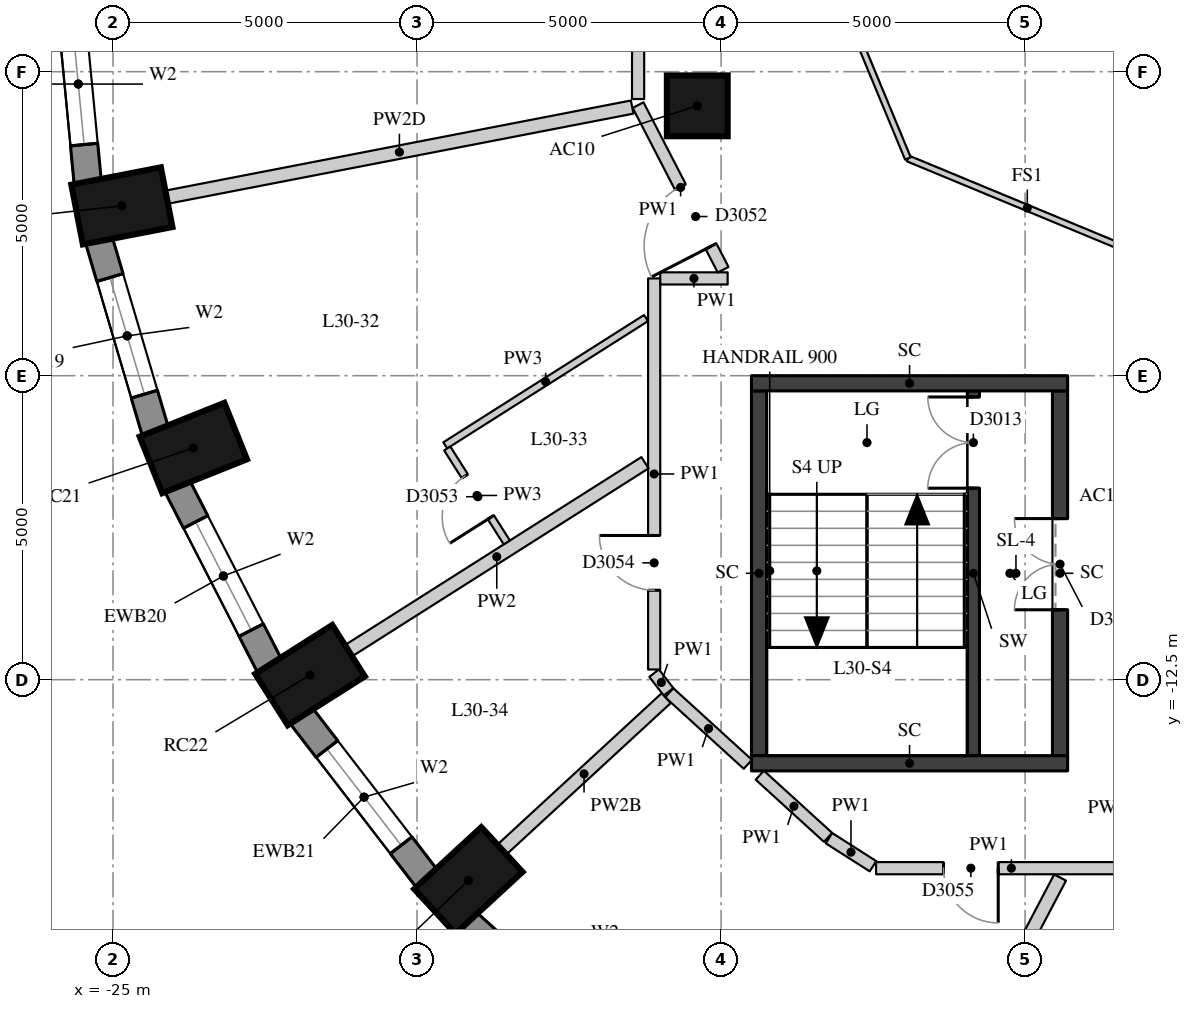
"""IFC4 building model, lengths in metres.
Left out: names, types, materials, properties, quantities, classifications, styles, units other than length and angle.
Written with IfcOpenShell. Run it as: python <this file> out.ifc"""

import sys

from ifc_helpers import new_model, si_unit, direction, frame, frame_2d, origin, origin_2d, place, context, subcontext, project, spatial, rectangle, extrude, element, fill, save


model = new_model("IFC4")
c1 = context("Model", 3, precision=1e-05, world=origin(), true_north=direction((0.0, 1.0)))
c2 = subcontext(c1, "Body", "Model", "MODEL_VIEW")
j1 = project(units=[si_unit("LENGTHUNIT", "METRE"), si_unit("PLANEANGLEUNIT", "RADIAN")], contexts=[c1])
p1 = place(None, origin())
s1 = spatial("IfcSite", under=j1, at=p1, CompositionType="ELEMENT")
p2 = place(p1, origin())
s2 = spatial("IfcBuilding", under=s1, at=p2, CompositionType="ELEMENT")
p3 = place(p2, frame((0.0, 0.0, 108.7)))
s3 = spatial("IfcBuildingStorey", under=s2, at=p3, CompositionType="ELEMENT", Elevation=108.7)
for number, where, z_axis, x_axis in (
    (1, (-24.854, -4.707, 0.0), (0.0, 0.0, 1.0), (-0.982, -0.19, 0.0)),
    (2, (-23.679, -8.689, 0.0), (0.0, 0.0, 1.0), (-0.929, -0.371, 0.0)),
    (3, (-21.76, -12.425, 0.0), (0.0, 0.0, 1.0), (-0.845, -0.536, 0.0)),
    (4, (-19.156, -15.802, 0.0), (0.0, 0.0, 1.0), (-0.735, -0.678, 0.0)),
):
    element("IfcColumn", number, at=place(p3, frame(where, z_axis=z_axis, x_axis=x_axis)), inside=s3, PredefinedType="COLUMN", context=c2, shape_type="SweptSolid", body=[
        extrude(rectangle(XDim=1.5, YDim=1.0, at=origin_2d()), origin(), (0.0, 0.0, 1.0), 3.3),
    ])
p4 = place(p3, frame((-15.391, -3.062, 0.0), z_axis=(0.0, 0.0, 1.0), x_axis=(1.0, 0.0, 0.0)))
e5 = element("IfcColumn", 5, at=p4, inside=s3, PredefinedType="COLUMN", context=c2, shape_type="SweptSolid", body=[
    extrude(rectangle(XDim=1.0, YDim=1.0, at=origin_2d()), origin(), (0.0, 0.0, 1.0), 3.3),
])
p5 = place(p3, frame((-25.728, -1.08, 0.0), z_axis=(0.0, 0.0, 1.0), x_axis=(0.095967726544, -0.995384446062, 0.0)))
e6 = element("IfcWall", 6, at=p5, inside=s3, PredefinedType="SOLIDWALL", context=c2, shape_type="SweptSolid", body=[
    extrude(rectangle(XDim=3.261, YDim=0.45, at=frame_2d((1.631, 0.0))), origin(), (0.0, 0.0, 1.0), 3.02),
])
p6 = place(p5, frame((0.631, 0.0, 0.4)))
e7 = element("IfcOpeningElement", 7, at=p6, cuts=e6, PredefinedType="OPENING", context=c2, shape_type="SweptSolid", body=[
    extrude(rectangle(XDim=2.0, YDim=1.75, at=frame_2d((1.0, 0.875))), frame((0.0, 0.235, 0.0), z_axis=(0.0, -1.0, 0.0), x_axis=(1.0, 0.0, 0.0)), (0.0, 0.0, 1.0), 0.47),
])
p7 = place(p3, frame((-25.232, -5.269, 0.0), z_axis=(0.0, 0.0, 1.0), x_axis=(0.283051078697, -0.959104836214, 0.0)))
e8 = element("IfcWall", 8, at=p7, inside=s3, PredefinedType="SOLIDWALL", context=c2, shape_type="SweptSolid", body=[
    extrude(rectangle(XDim=3.286, YDim=0.45, at=frame_2d((1.643, 0.0))), origin(), (0.0, 0.0, 1.0), 3.02),
])
p8 = place(p7, frame((0.643, 0.0, 0.4)))
e9 = element("IfcOpeningElement", 9, at=p8, cuts=e8, PredefinedType="OPENING", context=c2, shape_type="SweptSolid", body=[
    extrude(rectangle(XDim=2.0, YDim=1.75, at=frame_2d((1.0, 0.875))), frame((0.0, 0.235, 0.0), z_axis=(0.0, -1.0, 0.0), x_axis=(1.0, 0.0, 0.0)), (0.0, 0.0, 1.0), 0.47),
])
p9 = place(p3, frame((-23.945, -9.312, 0.0), z_axis=(0.0, 0.0, 1.0), x_axis=(0.456828186229, -0.889554949549, 0.0)))
e10 = element("IfcWall", 10, at=p9, inside=s3, PredefinedType="SOLIDWALL", context=c2, shape_type="SweptSolid", body=[
    extrude(rectangle(XDim=3.333, YDim=0.45, at=frame_2d((1.667, 0.0))), origin(), (0.0, 0.0, 1.0), 3.02),
])
p10 = place(p9, frame((0.666, 0.0, 0.4)))
e11 = element("IfcOpeningElement", 11, at=p10, cuts=e10, PredefinedType="OPENING", context=c2, shape_type="SweptSolid", body=[
    extrude(rectangle(XDim=2.0, YDim=1.75, at=frame_2d((1.0, 0.875))), frame((0.0, 0.235, 0.0), z_axis=(0.0, -1.0, 0.0), x_axis=(1.0, 0.0, 0.0)), (0.0, 0.0, 1.0), 0.47),
])
p11 = place(p3, frame((-21.908, -13.087, 0.0), z_axis=(0.0, 0.0, 1.0), x_axis=(0.610693945156, -0.791866721961, 0.0)))
e12 = element("IfcWall", 12, at=p11, inside=s3, PredefinedType="SOLIDWALL", context=c2, shape_type="SweptSolid", body=[
    extrude(rectangle(XDim=3.395, YDim=0.45, at=frame_2d((1.697, 0.0))), origin(), (0.0, 0.0, 1.0), 3.02),
])
p12 = place(p11, frame((0.697, 0.0, 0.4)))
e13 = element("IfcOpeningElement", 13, at=p12, cuts=e12, PredefinedType="OPENING", context=c2, shape_type="SweptSolid", body=[
    extrude(rectangle(XDim=2.0, YDim=1.75, at=frame_2d((1.0, 0.875))), frame((0.0, 0.235, 0.0), z_axis=(0.0, -1.0, 0.0), x_axis=(1.0, 0.0, 0.0)), (0.0, 0.0, 1.0), 0.47),
])
p13 = place(p3, frame((-19.184, -16.481, 0.0), z_axis=(0.0, 0.0, 1.0), x_axis=(0.740364106106, -0.672206062446, 0.0)))
e14 = element("IfcWall", 14, at=p13, inside=s3, PredefinedType="SOLIDWALL", context=c2, shape_type="SweptSolid", body=[
    extrude(rectangle(XDim=3.464, YDim=0.45, at=frame_2d((1.732, 0.0))), origin(), (0.0, 0.0, 1.0), 3.02),
])
p14 = place(p13, frame((0.732, 0.0, 0.4)))
e15 = element("IfcOpeningElement", 15, at=p14, cuts=e14, PredefinedType="OPENING", context=c2, shape_type="SweptSolid", body=[
    extrude(rectangle(XDim=2.0, YDim=1.75, at=frame_2d((1.0, 0.875))), frame((0.0, 0.235, 0.0), z_axis=(0.0, -1.0, 0.0), x_axis=(1.0, 0.0, 0.0)), (0.0, 0.0, 1.0), 0.47),
])
p15 = place(p3, frame((-10.85, -13.75, 0.0), z_axis=(0.0, 0.0, 1.0), x_axis=(0.0, 1.0, 0.0)))
e16 = element("IfcWall", 16, at=p15, inside=s3, PredefinedType="SHEAR", context=c2, shape_type="SweptSolid", body=[
    extrude(rectangle(XDim=6.0, YDim=0.2, at=frame_2d((3.0, 0.0))), origin(), (0.0, 0.0, 1.0), 3.02),
])
p16 = place(p15, frame((4.4, 0.0, 0.0)))
e17 = element("IfcOpeningElement", 17, at=p16, cuts=e16, PredefinedType="OPENING", context=c2, shape_type="SweptSolid", body=[
    extrude(rectangle(XDim=1.5, YDim=2.1, at=frame_2d((0.75, 1.05))), frame((0.0, 0.11, 0.0), z_axis=(0.0, -1.0, 0.0), x_axis=(1.0, 0.0, 0.0)), (0.0, 0.0, 1.0), 0.22),
])
p17 = place(p3, frame((-14.375, -13.75, -0.28), z_axis=(0.0, 0.0, 1.0), x_axis=(0.0, 1.0, 0.0)))
e18 = element("IfcWall", 18, at=p17, inside=s3, PredefinedType="SHEAR", context=c2, shape_type="SweptSolid", body=[
    extrude(rectangle(XDim=6.0, YDim=0.25, at=frame_2d((3.0, 0.0))), origin(), (0.0, 0.0, 1.0), 3.3),
])
p18 = place(p3, frame((-9.425, -13.75, -0.28), z_axis=(0.0, 0.0, 1.0), x_axis=(0.0, 1.0, 0.0)))
e19 = element("IfcWall", 19, at=p18, inside=s3, PredefinedType="SHEAR", context=c2, shape_type="SweptSolid", body=[
    extrude(rectangle(XDim=6.0, YDim=0.25, at=frame_2d((3.0, 0.0))), origin(), (0.0, 0.0, 1.0), 3.3),
])
p19 = place(p18, frame((2.4, 0.0, 0.28)))
e20 = element("IfcOpeningElement", 20, at=p19, cuts=e19, PredefinedType="OPENING", context=c2, shape_type="SweptSolid", body=[
    extrude(rectangle(XDim=1.5, YDim=2.1, at=frame_2d((0.75, 1.05))), frame((0.0, 0.135, 0.0), z_axis=(0.0, -1.0, 0.0), x_axis=(1.0, 0.0, 0.0)), (0.0, 0.0, 1.0), 0.27),
])
for number, where, z_axis, x_axis in (
    (21, (-14.5, -7.625, -0.28), (0.0, 0.0, 1.0), (1.0, 0.0, 0.0)),
    (22, (-14.5, -13.875, -0.28), (0.0, 0.0, 1.0), (1.0, 0.0, 0.0)),
):
    element("IfcWall", number, at=place(p3, frame(where, z_axis=z_axis, x_axis=x_axis)), inside=s3, PredefinedType="SHEAR", context=c2, shape_type="SweptSolid", body=[
        extrude(rectangle(XDim=5.2, YDim=0.25, at=frame_2d((2.6, 0.0))), origin(), (0.0, 0.0, 1.0), 3.3),
    ])
p20 = place(p3, frame((-14.56, -13.891, 0.0), z_axis=(0.0, 0.0, 1.0), x_axis=(-0.739440483737, 0.673221932954, 0.0)))
e23 = element("IfcWall", 23, at=p20, inside=s3, PredefinedType="PARTITIONING", context=c2, shape_type="SweptSolid", body=[
    extrude(rectangle(XDim=1.748, YDim=0.2, at=frame_2d((0.874, 0.0))), origin(), (0.0, 0.0, 1.0), 3.02),
])
p21 = place(p3, frame((-15.864, -12.699, 0.0), z_axis=(0.0, 0.0, 1.0), x_axis=(-0.61004607296, 0.792365943782, 0.0)))
e24 = element("IfcWall", 24, at=p21, inside=s3, PredefinedType="PARTITIONING", context=c2, shape_type="SweptSolid", body=[
    extrude(rectangle(XDim=0.387, YDim=0.2, at=frame_2d((0.193, 0.0))), origin(), (0.0, 0.0, 1.0), 3.02),
])
p22 = place(p3, frame((-16.1, -12.332, 0.0), z_axis=(0.0, 0.0, 1.0), x_axis=(0.0, 1.0, 0.0)))
e25 = element("IfcWall", 25, at=p22, inside=s3, PredefinedType="PARTITIONING", context=c2, shape_type="SweptSolid", body=[
    extrude(rectangle(XDim=6.432, YDim=0.2, at=frame_2d((3.216, 0.0))), origin(), (0.0, 0.0, 1.0), 3.02),
])
p23 = place(p22, frame((1.304, 0.0, 0.0)))
e26 = element("IfcOpeningElement", 26, at=p23, cuts=e25, PredefinedType="OPENING", context=c2, shape_type="SweptSolid", body=[
    extrude(rectangle(XDim=0.9, YDim=2.1, at=frame_2d((0.45, 1.05))), frame((0.0, 0.11, 0.0), z_axis=(0.0, -1.0, 0.0), x_axis=(1.0, 0.0, 0.0)), (0.0, 0.0, 1.0), 0.22),
])
p24 = place(p3, frame((-16.0, -5.9, 0.0), z_axis=(0.0, 0.0, 1.0), x_axis=(1.0, 0.0, 0.0)))
e27 = element("IfcWall", 27, at=p24, inside=s3, PredefinedType="PARTITIONING", context=c2, shape_type="SweptSolid", body=[
    extrude(rectangle(XDim=1.108, YDim=0.2, at=frame_2d((0.554, 0.0))), origin(), (0.0, 0.0, 1.0), 3.02),
])
p25 = place(p3, frame((-14.966, -5.757, 0.0), z_axis=(0.0, 0.0, 1.0), x_axis=(-0.458904116107, 0.888485797422, 0.0)))
e28 = element("IfcWall", 28, at=p25, inside=s3, PredefinedType="PARTITIONING", context=c2, shape_type="SweptSolid", body=[
    extrude(rectangle(XDim=3.047, YDim=0.2, at=frame_2d((1.524, 0.0))), origin(), (0.0, 0.0, 1.0), 3.02),
])
p26 = place(p25, frame((0.435, 0.0, 0.0)))
e29 = element("IfcOpeningElement", 29, at=p26, cuts=e28, PredefinedType="OPENING", context=c2, shape_type="SweptSolid", body=[
    extrude(rectangle(XDim=1.1, YDim=2.1, at=frame_2d((0.55, 1.05))), frame((0.0, 0.11, 0.0), z_axis=(0.0, -1.0, 0.0), x_axis=(1.0, 0.0, 0.0)), (0.0, 0.0, 1.0), 0.22),
])
p27 = place(p3, frame((-16.364, -2.95, 0.0), z_axis=(0.0, 0.0, 1.0), x_axis=(0.0, 1.0, 0.0)))
e30 = element("IfcWall", 30, at=p27, inside=s3, PredefinedType="PARTITIONING", context=c2, shape_type="SweptSolid", body=[
    extrude(rectangle(XDim=4.799, YDim=0.2, at=frame_2d((2.4, 0.0))), origin(), (0.0, 0.0, 1.0), 2.52),
])
p28 = place(p27, frame((0.835, 0.0, 0.0)))
e31 = element("IfcOpeningElement", 31, at=p28, cuts=e30, PredefinedType="OPENING", context=c2, shape_type="SweptSolid", body=[
    extrude(rectangle(XDim=0.9, YDim=2.1, at=frame_2d((0.45, 1.05))), frame((0.0, 0.11, 0.0), z_axis=(0.0, -1.0, 0.0), x_axis=(1.0, 0.0, 0.0)), (0.0, 0.0, 1.0), 0.22),
])
p29 = place(p3, frame((-8.0, -15.6, 0.0), z_axis=(0.0, 0.0, 1.0), x_axis=(-1.0, 0.0, 0.0)))
e32 = element("IfcWall", 32, at=p29, inside=s3, PredefinedType="PARTITIONING", context=c2, shape_type="SweptSolid", body=[
    extrude(rectangle(XDim=4.451, YDim=0.2, at=frame_2d((2.226, 0.0))), origin(), (0.0, 0.0, 1.0), 3.02),
])
p30 = place(p29, frame((2.442, 0.0, 0.0)))
e33 = element("IfcOpeningElement", 33, at=p30, cuts=e32, PredefinedType="OPENING", context=c2, shape_type="SweptSolid", body=[
    extrude(rectangle(XDim=0.9, YDim=2.1, at=frame_2d((0.45, 1.05))), frame((0.0, 0.11, 0.0), z_axis=(0.0, -1.0, 0.0), x_axis=(1.0, 0.0, 0.0)), (0.0, 0.0, 1.0), 0.22),
])
p31 = place(p3, frame((-12.501, -15.568, 0.0), z_axis=(0.0, 0.0, 1.0), x_axis=(-0.843169167706, 0.537648355926, 0.0)))
e34 = element("IfcWall", 34, at=p31, inside=s3, PredefinedType="PARTITIONING", context=c2, shape_type="SweptSolid", body=[
    extrude(rectangle(XDim=0.858, YDim=0.2, at=frame_2d((0.429, 0.0))), origin(), (0.0, 0.0, 1.0), 3.02),
])
p32 = place(p3, frame((-13.24, -15.093, 0.0), z_axis=(0.0, 0.0, 1.0), x_axis=(-0.739438095557, 0.673224556028, 0.0)))
e35 = element("IfcWall", 35, at=p32, inside=s3, PredefinedType="PARTITIONING", context=c2, shape_type="SweptSolid", body=[
    extrude(rectangle(XDim=1.519, YDim=0.2, at=frame_2d((0.76, 0.0))), origin(), (0.0, 0.0, 1.0), 3.02),
])
p33 = place(p3, frame((-24.118, -4.564, 0.0), z_axis=(0.0, 0.0, 1.0), x_axis=(0.981765151757, 0.190097834799, 0.0)))
e36 = element("IfcWall", 36, at=p33, inside=s3, PredefinedType="PARTITIONING", context=c2, shape_type="SweptSolid", body=[
    extrude(rectangle(XDim=7.798, YDim=0.22, at=frame_2d((3.899, 0.0))), origin(), (0.0, 0.0, 1.0), 2.47),
])
p34 = place(p3, frame((-21.126, -12.023, 0.0), z_axis=(0.0, 0.0, 1.0), x_axis=(0.844499715613, 0.535556001114, 0.0)))
e37 = element("IfcWall", 37, at=p34, inside=s3, PredefinedType="PARTITIONING", context=c2, shape_type="SweptSolid", body=[
    extrude(rectangle(XDim=5.773, YDim=0.22, at=frame_2d((2.887, 0.0))), origin(), (0.0, 0.0, 1.0), 3.02),
])
p35 = place(p3, frame((-18.604, -15.294, 0.0), z_axis=(0.0, 0.0, 1.0), x_axis=(0.73529495628, 0.677747244383, 0.0)))
e38 = element("IfcWall", 38, at=p35, inside=s3, PredefinedType="PARTITIONING", context=c2, shape_type="SweptSolid", body=[
    extrude(rectangle(XDim=3.674, YDim=0.22, at=frame_2d((1.837, 0.0))), origin(), (0.0, 0.0, 1.0), 2.57),
])
p36 = place(p3, frame((-11.876, -20.418, 0.0), z_axis=(0.0, 0.0, 1.0), x_axis=(0.465320539057, 0.885142246157, 0.0)))
e39 = element("IfcWall", 39, at=p36, inside=s3, PredefinedType="PARTITIONING", context=c2, shape_type="SweptSolid", body=[
    extrude(rectangle(XDim=5.269, YDim=0.22, at=frame_2d((2.635, 0.0))), origin(), (0.0, 0.0, 1.0), 3.02),
])
p37 = place(p3, frame((-16.234, -6.552, 0.0), z_axis=(0.0, 0.0, 1.0), x_axis=(-0.844514089089, -0.535533335406, 0.0)))
e40 = element("IfcWall", 40, at=p37, inside=s3, PredefinedType="PARTITIONING", context=c2, shape_type="SweptSolid", body=[
    extrude(rectangle(XDim=3.91, YDim=0.12, at=frame_2d((1.955, 0.0))), origin(), (0.0, 0.0, 1.0), 3.02),
])
p38 = place(p3, frame((-6.25, -14.013, 0.0), z_axis=(0.0, 0.0, 1.0), x_axis=(-0.465288210927, -0.885159240347, 0.0)))
e41 = element("IfcWall", 41, at=p38, inside=s3, PredefinedType="PARTITIONING", context=c2, shape_type="SweptSolid", body=[
    extrude(rectangle(XDim=5.644, YDim=0.12, at=frame_2d((2.822, 0.0))), origin(), (0.0, 0.0, 1.0), 3.02),
])
p39 = place(p3, frame((-19.503, -8.697, 0.0), z_axis=(0.0, 0.0, 1.0), x_axis=(0.535467767516, -0.844555664211, 0.0)))
e42 = element("IfcWall", 42, at=p39, inside=s3, PredefinedType="PARTITIONING", context=c2, shape_type="SweptSolid", body=[
    extrude(rectangle(XDim=1.83, YDim=0.12, at=frame_2d((0.915, 0.0))), origin(), (0.0, 0.0, 1.0), 3.02),
])
p40 = place(p39, frame((0.54, 0.0, 0.0)))
e43 = element("IfcOpeningElement", 43, at=p40, cuts=e42, PredefinedType="OPENING", context=c2, shape_type="SweptSolid", body=[
    extrude(rectangle(XDim=0.8, YDim=2.1, at=frame_2d((0.4, 1.05))), frame((0.0, 0.07, 0.0), z_axis=(0.0, -1.0, 0.0), x_axis=(1.0, 0.0, 0.0)), (0.0, 0.0, 1.0), 0.14),
])
for number, where, z_axis, x_axis in (
    (44, (-8.0, -5.554, 0.0), (0.0, 0.0, 1.0), (-0.924, 0.383, 0.0)),
    (45, (-11.927, -3.927, 0.0), (0.0, 0.0, 1.0), (-0.383, 0.924, 0.0)),
):
    element("IfcWall", number, at=place(p3, frame(where, z_axis=z_axis, x_axis=x_axis)), inside=s3, PredefinedType="PARTITIONING", context=c2, shape_type="SweptSolid", body=[
        extrude(rectangle(XDim=4.251, YDim=0.1, at=frame_2d((2.125, 0.0))), origin(), (0.0, 0.0, 1.0), 3.02),
    ])
p41 = place(p6, origin())
e46 = element("IfcWindow", 46, at=p41, inside=s3, PartitioningType="SINGLE_PANEL", PredefinedType="WINDOW", context=c2, shape_type="SweptSolid", body=[
    extrude(rectangle(XDim=2.0, YDim=1.75, at=frame_2d((1.0, 0.875))), frame((0.0, 0.035, 0.0), z_axis=(0.0, -1.0, 0.0), x_axis=(1.0, 0.0, 0.0)), (0.0, 0.0, 1.0), 0.06),
])
fill(e7, e46)
p42 = place(p8, origin())
e47 = element("IfcWindow", 47, at=p42, inside=s3, PartitioningType="SINGLE_PANEL", PredefinedType="WINDOW", context=c2, shape_type="SweptSolid", body=[
    extrude(rectangle(XDim=2.0, YDim=1.75, at=frame_2d((1.0, 0.875))), frame((0.0, 0.035, 0.0), z_axis=(0.0, -1.0, 0.0), x_axis=(1.0, 0.0, 0.0)), (0.0, 0.0, 1.0), 0.06),
])
fill(e9, e47)
p43 = place(p10, origin())
e48 = element("IfcWindow", 48, at=p43, inside=s3, PartitioningType="SINGLE_PANEL", PredefinedType="WINDOW", context=c2, shape_type="SweptSolid", body=[
    extrude(rectangle(XDim=2.0, YDim=1.75, at=frame_2d((1.0, 0.875))), frame((0.0, 0.035, 0.0), z_axis=(0.0, -1.0, 0.0), x_axis=(1.0, 0.0, 0.0)), (0.0, 0.0, 1.0), 0.06),
])
fill(e11, e48)
p44 = place(p12, origin())
e49 = element("IfcWindow", 49, at=p44, inside=s3, PartitioningType="SINGLE_PANEL", PredefinedType="WINDOW", context=c2, shape_type="SweptSolid", body=[
    extrude(rectangle(XDim=2.0, YDim=1.75, at=frame_2d((1.0, 0.875))), frame((0.0, 0.035, 0.0), z_axis=(0.0, -1.0, 0.0), x_axis=(1.0, 0.0, 0.0)), (0.0, 0.0, 1.0), 0.06),
])
fill(e13, e49)
p45 = place(p16, origin())
e50 = element("IfcDoor", 50, at=p45, inside=s3, OperationType="DOUBLE_DOOR_SINGLE_SWING", PredefinedType="DOOR", context=c2, shape_type="SweptSolid", body=[
    extrude(rectangle(XDim=1.5, YDim=2.1, at=frame_2d((0.75, 1.05))), frame((0.0, 0.025, 0.0), z_axis=(0.0, -1.0, 0.0), x_axis=(1.0, 0.0, 0.0)), (0.0, 0.0, 1.0), 0.05),
])
fill(e17, e50)
p46 = place(p19, origin())
e51 = element("IfcDoor", 51, at=p46, inside=s3, OperationType="DOUBLE_DOOR_SINGLE_SWING", PredefinedType="DOOR", context=c2, shape_type="SweptSolid", body=[
    extrude(rectangle(XDim=1.5, YDim=2.1, at=frame_2d((0.75, 1.05))), frame((0.0, 0.025, 0.0), z_axis=(0.0, -1.0, 0.0), x_axis=(1.0, 0.0, 0.0)), (0.0, 0.0, 1.0), 0.05),
])
fill(e20, e51)
p47 = place(p26, origin())
e52 = element("IfcDoor", 52, at=p47, inside=s3, OperationType="SINGLE_SWING_LEFT", PredefinedType="DOOR", context=c2, shape_type="SweptSolid", body=[
    extrude(rectangle(XDim=1.1, YDim=2.1, at=frame_2d((0.55, 1.05))), frame((0.0, 0.025, 0.0), z_axis=(0.0, -1.0, 0.0), x_axis=(1.0, 0.0, 0.0)), (0.0, 0.0, 1.0), 0.05),
])
fill(e29, e52)
p48 = place(p40, origin())
e53 = element("IfcDoor", 53, at=p48, inside=s3, OperationType="SINGLE_SWING_LEFT", PredefinedType="DOOR", context=c2, shape_type="SweptSolid", body=[
    extrude(rectangle(XDim=0.8, YDim=2.1, at=frame_2d((0.4, 1.05))), frame((0.0, 0.025, 0.0), z_axis=(0.0, -1.0, 0.0), x_axis=(1.0, 0.0, 0.0)), (0.0, 0.0, 1.0), 0.05),
])
fill(e43, e53)
p49 = place(p23, origin())
e54 = element("IfcDoor", 54, at=p49, inside=s3, OperationType="SINGLE_SWING_RIGHT", PredefinedType="DOOR", context=c2, shape_type="SweptSolid", body=[
    extrude(rectangle(XDim=0.9, YDim=2.1, at=frame_2d((0.45, 1.05))), frame((0.0, 0.025, 0.0), z_axis=(0.0, -1.0, 0.0), x_axis=(1.0, 0.0, 0.0)), (0.0, 0.0, 1.0), 0.05),
])
fill(e26, e54)
p50 = place(p30, origin())
e55 = element("IfcDoor", 55, at=p50, inside=s3, OperationType="SINGLE_SWING_LEFT", PredefinedType="DOOR", context=c2, shape_type="SweptSolid", body=[
    extrude(rectangle(XDim=0.9, YDim=2.1, at=frame_2d((0.45, 1.05))), frame((0.0, 0.025, 0.0), z_axis=(0.0, -1.0, 0.0), x_axis=(1.0, 0.0, 0.0)), (0.0, 0.0, 1.0), 0.05),
])
fill(e33, e55)
save(model, sys.argv[1])
